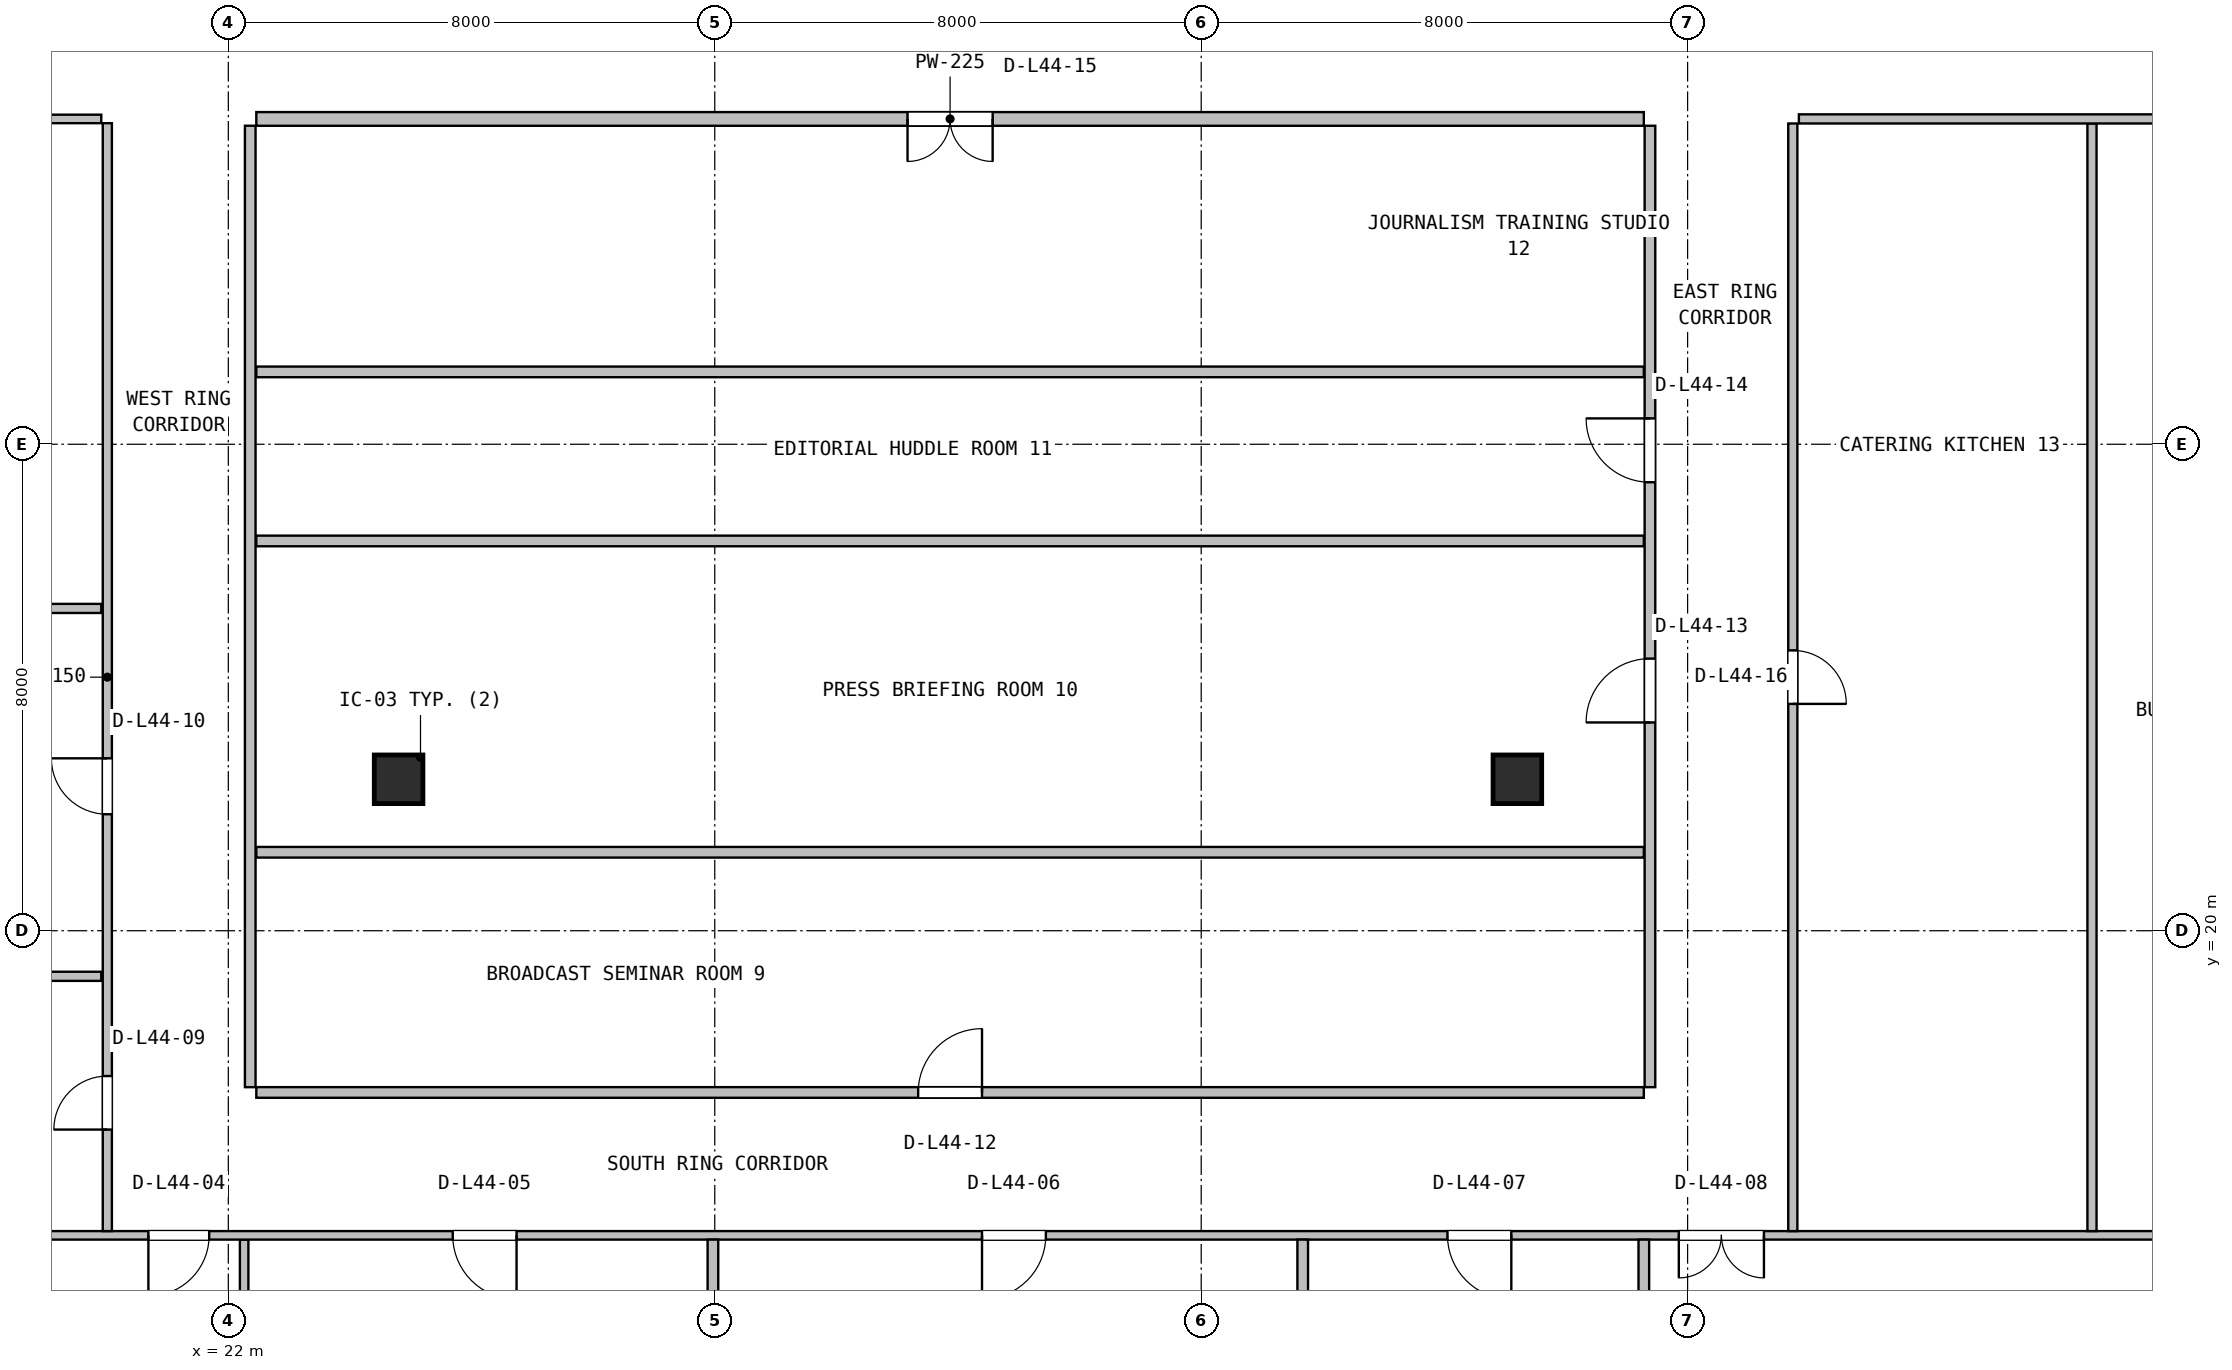
"""IFC4 building model, lengths in metres.
Left out: names, types, materials, properties, quantities, classifications, styles, units other than length and angle.
Written with IfcOpenShell. Run it as: python <this file> out.ifc"""

import sys

from ifc_helpers import new_model, si_unit, direction, frame, frame_2d, origin, origin_2d, place, context, subcontext, project, spatial, rectangle, extrude, source, transform, mapped, element, fill, save


model = new_model("IFC4")
c1 = context("Model", 3, precision=1e-05, world=origin(), true_north=direction((0.0, 1.0)))
c2 = subcontext(c1, "Body", "Model", "MODEL_VIEW")
j1 = project(units=[si_unit("LENGTHUNIT", "METRE"), si_unit("PLANEANGLEUNIT", "RADIAN")], contexts=[c1])
p1 = place(None, origin())
s1 = spatial("IfcSite", under=j1, at=p1, CompositionType="ELEMENT")
p2 = place(p1, origin())
s2 = spatial("IfcBuilding", under=s1, at=p2, CompositionType="ELEMENT")
p3 = place(p2, frame((0.0, 0.0, 180.0)))
s3 = spatial("IfcBuildingStorey", under=s2, at=p3, CompositionType="ELEMENT", Elevation=180.0)
m1 = source(origin(), c2, "Body", "SweptSolid", [
    extrude(rectangle(XDim=0.8, YDim=0.8, at=origin_2d()), origin(), (0.0, 0.0, 1.0), 3.8),
])
for number, where, z_axis, x_axis in (
    (1, (24.8, 22.49, 0.0), (0.0, 0.0, 1.0), (1.0, 0.0, 0.0)),
    (2, (43.2, 22.49, 0.0), (0.0, 0.0, 1.0), (1.0, 0.0, 0.0)),
):
    element("IfcColumn", number, at=place(p3, frame(where, z_axis=z_axis, x_axis=x_axis)), inside=s3, PredefinedType="COLUMN", context=c2, shape_type="MappedRepresentation", body=[
        mapped(m1, transform((0.0, 0.0, 0.0), x_axis=(1.0, 0.0, 0.0), y_axis=(0.0, 1.0, 0.0), z_axis=(0.0, 0.0, 1.0), scale=1.0)),
    ])
p4 = place(p3, frame((22.26, 7.38, 0.0), z_axis=(0.0, 0.0, 1.0), x_axis=(0.0, 1.0, 0.0)))
e3 = element("IfcWall", 3, at=p4, inside=s3, PredefinedType="PARTITIONING", context=c2, shape_type="SweptSolid", body=[
    extrude(rectangle(XDim=7.54, YDim=0.14, at=frame_2d((3.77, 0.0))), origin(), (0.0, 0.0, 1.0), 3.108),
])
p5 = place(p3, frame((7.18, 14.99, 0.0), z_axis=(0.0, 0.0, 1.0), x_axis=(1.0, 0.0, 0.0)))
e4 = element("IfcWall", 4, at=p5, inside=s3, PredefinedType="PARTITIONING", context=c2, shape_type="SweptSolid", body=[
    extrude(rectangle(XDim=53.64, YDim=0.14, at=frame_2d((26.82, 0.0))), origin(), (0.0, 0.0, 1.0), 2.909),
])
p6 = place(p5, frame((13.505, 0.0, 0.0)))
e5 = element("IfcOpeningElement", 5, at=p6, cuts=e4, PredefinedType="OPENING", context=c2, shape_type="SweptSolid", body=[
    extrude(rectangle(XDim=1.0, YDim=2.1, at=frame_2d((0.5, 1.05))), frame((0.0, 0.08, 0.0), z_axis=(0.0, -1.0, 0.0), x_axis=(1.0, 0.0, 0.0)), (0.0, 0.0, 1.0), 0.16),
])
p7 = place(p5, frame((18.51, 0.0, 0.0)))
e6 = element("IfcOpeningElement", 6, at=p7, cuts=e4, PredefinedType="OPENING", context=c2, shape_type="SweptSolid", body=[
    extrude(rectangle(XDim=1.05, YDim=2.1, at=frame_2d((0.525, 1.05))), frame((0.0, 0.08, 0.0), z_axis=(0.0, -1.0, 0.0), x_axis=(1.0, 0.0, 0.0)), (0.0, 0.0, 1.0), 0.16),
])
p8 = place(p5, frame((27.215, 0.0, 0.0)))
e7 = element("IfcOpeningElement", 7, at=p8, cuts=e4, PredefinedType="OPENING", context=c2, shape_type="SweptSolid", body=[
    extrude(rectangle(XDim=1.05, YDim=2.1, at=frame_2d((0.525, 1.05))), frame((0.0, 0.08, 0.0), z_axis=(0.0, -1.0, 0.0), x_axis=(1.0, 0.0, 0.0)), (0.0, 0.0, 1.0), 0.16),
])
p9 = place(p5, frame((34.87, 0.0, 0.0)))
e8 = element("IfcOpeningElement", 8, at=p9, cuts=e4, PredefinedType="OPENING", context=c2, shape_type="SweptSolid", body=[
    extrude(rectangle(XDim=1.05, YDim=2.1, at=frame_2d((0.525, 1.05))), frame((0.0, 0.08, 0.0), z_axis=(0.0, -1.0, 0.0), x_axis=(1.0, 0.0, 0.0)), (0.0, 0.0, 1.0), 0.16),
])
p10 = place(p5, frame((38.675, 0.0, 0.0)))
e9 = element("IfcOpeningElement", 9, at=p10, cuts=e4, PredefinedType="OPENING", context=c2, shape_type="SweptSolid", body=[
    extrude(rectangle(XDim=1.4, YDim=2.12, at=frame_2d((0.7, 1.06))), frame((0.0, 0.08, 0.0), z_axis=(0.0, -1.0, 0.0), x_axis=(1.0, 0.0, 0.0)), (0.0, 0.0, 1.0), 0.16),
])
for number, where, z_axis, x_axis in (
    (10, (29.97, 7.38, 0.0), (0.0, 0.0, 1.0), (0.0, 1.0, 0.0)),
    (11, (39.67, 7.38, 0.0), (0.0, 0.0, 1.0), (0.0, 1.0, 0.0)),
    (12, (45.28, 7.38, 0.0), (0.0, 0.0, 1.0), (0.0, 1.0, 0.0)),
):
    element("IfcWall", number, at=place(p3, frame(where, z_axis=z_axis, x_axis=x_axis)), inside=s3, PredefinedType="PARTITIONING", context=c2, shape_type="SweptSolid", body=[
        extrude(rectangle(XDim=7.54, YDim=0.175, at=frame_2d((3.77, 0.0))), origin(), (0.0, 0.0, 1.0), 3.108),
    ])
p11 = place(p3, frame((20.01, 15.06, 0.0), z_axis=(0.0, 0.0, 1.0), x_axis=(0.0, 1.0, 0.0)))
e13 = element("IfcWall", 13, at=p11, inside=s3, PredefinedType="PARTITIONING", context=c2, shape_type="SweptSolid", body=[
    extrude(rectangle(XDim=18.22, YDim=0.15, at=frame_2d((9.11, 0.0))), origin(), (0.0, 0.0, 1.0), 3.222),
])
p12 = place(p11, frame((1.67, 0.0, 0.0)))
e14 = element("IfcOpeningElement", 14, at=p12, cuts=e13, PredefinedType="OPENING", context=c2, shape_type="SweptSolid", body=[
    extrude(rectangle(XDim=0.88, YDim=2.06, at=frame_2d((0.44, 1.03))), frame((0.0, 0.085, 0.0), z_axis=(0.0, -1.0, 0.0), x_axis=(1.0, 0.0, 0.0)), (0.0, 0.0, 1.0), 0.17),
])
p13 = place(p11, frame((6.855, 0.0, 0.0)))
e15 = element("IfcOpeningElement", 15, at=p13, cuts=e13, PredefinedType="OPENING", context=c2, shape_type="SweptSolid", body=[
    extrude(rectangle(XDim=0.92, YDim=2.08, at=frame_2d((0.46, 1.04))), frame((0.0, 0.085, 0.0), z_axis=(0.0, -1.0, 0.0), x_axis=(1.0, 0.0, 0.0)), (0.0, 0.0, 1.0), 0.17),
])
for number, where, z_axis, x_axis in (
    (16, (7.18, 19.25, 0.0), (0.0, 0.0, 1.0), (1.0, 0.0, 0.0)),
    (17, (7.18, 25.3, 0.0), (0.0, 0.0, 1.0), (1.0, 0.0, 0.0)),
):
    element("IfcWall", number, at=place(p3, frame(where, z_axis=z_axis, x_axis=x_axis)), inside=s3, PredefinedType="PARTITIONING", context=c2, shape_type="SweptSolid", body=[
        extrude(rectangle(XDim=12.73, YDim=0.15, at=frame_2d((6.365, 0.0))), origin(), (0.0, 0.0, 1.0), 3.108),
    ])
p14 = place(p3, frame((7.18, 33.35, 0.0), z_axis=(0.0, 0.0, 1.0), x_axis=(1.0, 0.0, 0.0)))
e18 = element("IfcWall", 18, at=p14, inside=s3, PredefinedType="PARTITIONING", context=c2, shape_type="SweptSolid", body=[
    extrude(rectangle(XDim=12.73, YDim=0.14, at=frame_2d((6.365, 0.0))), origin(), (0.0, 0.0, 1.0), 3.108),
])
p15 = place(p14, frame((7.8, 0.0, 0.0)))
e19 = element("IfcOpeningElement", 19, at=p15, cuts=e18, PredefinedType="OPENING", context=c2, shape_type="SweptSolid", body=[
    extrude(rectangle(XDim=1.0, YDim=2.1, at=frame_2d((0.5, 1.05))), frame((0.0, 0.08, 0.0), z_axis=(0.0, -1.0, 0.0), x_axis=(1.0, 0.0, 0.0)), (0.0, 0.0, 1.0), 0.16),
])
p16 = place(p3, frame((22.46, 17.34, 0.0), z_axis=(0.0, 0.0, 1.0), x_axis=(1.0, 0.0, 0.0)))
e20 = element("IfcWall", 20, at=p16, inside=s3, PredefinedType="PARTITIONING", context=c2, shape_type="SweptSolid", body=[
    extrude(rectangle(XDim=22.82, YDim=0.175, at=frame_2d((11.41, 0.0))), origin(), (0.0, 0.0, 1.0), 2.909),
])
p17 = place(p16, frame((10.885, 0.0, 0.0)))
e21 = element("IfcOpeningElement", 21, at=p17, cuts=e20, PredefinedType="OPENING", context=c2, shape_type="SweptSolid", body=[
    extrude(rectangle(XDim=1.05, YDim=2.1, at=frame_2d((0.525, 1.05))), frame((0.0, 0.098, 0.0), z_axis=(0.0, -1.0, 0.0), x_axis=(1.0, 0.0, 0.0)), (0.0, 0.0, 1.0), 0.195),
])
p18 = place(p3, frame((45.38, 17.427, 0.0), z_axis=(0.0, 0.0, 1.0), x_axis=(0.0, 1.0, 0.0)))
e22 = element("IfcWall", 22, at=p18, inside=s3, PredefinedType="PARTITIONING", context=c2, shape_type="SweptSolid", body=[
    extrude(rectangle(XDim=15.811, YDim=0.175, at=frame_2d((7.906, 0.0))), origin(), (0.0, 0.0, 1.0), 3.222),
])
p19 = place(p18, frame((5.998, 0.0, 0.0)))
e23 = element("IfcOpeningElement", 23, at=p19, cuts=e22, PredefinedType="OPENING", context=c2, shape_type="SweptSolid", body=[
    extrude(rectangle(XDim=1.05, YDim=2.1, at=frame_2d((0.525, 1.05))), frame((0.0, 0.098, 0.0), z_axis=(0.0, -1.0, 0.0), x_axis=(1.0, 0.0, 0.0)), (0.0, 0.0, 1.0), 0.195),
])
p20 = place(p18, frame((9.948, 0.0, 0.0)))
e24 = element("IfcOpeningElement", 24, at=p20, cuts=e22, PredefinedType="OPENING", context=c2, shape_type="SweptSolid", body=[
    extrude(rectangle(XDim=1.05, YDim=2.1, at=frame_2d((0.525, 1.05))), frame((0.0, 0.098, 0.0), z_axis=(0.0, -1.0, 0.0), x_axis=(1.0, 0.0, 0.0)), (0.0, 0.0, 1.0), 0.195),
])
p21 = place(p3, frame((22.46, 21.29, 0.0), z_axis=(0.0, 0.0, 1.0), x_axis=(1.0, 0.0, 0.0)))
e25 = element("IfcWall", 25, at=p21, inside=s3, PredefinedType="PARTITIONING", context=c2, shape_type="SweptSolid", body=[
    extrude(rectangle(XDim=22.82, YDim=0.175, at=frame_2d((11.41, 0.0))), origin(), (0.0, 0.0, 1.0), 2.909),
])
p22 = place(p3, frame((22.36, 17.427, 0.0), z_axis=(0.0, 0.0, 1.0), x_axis=(0.0, 1.0, 0.0)))
e26 = element("IfcWall", 26, at=p22, inside=s3, PredefinedType="PARTITIONING", context=c2, shape_type="SweptSolid", body=[
    extrude(rectangle(XDim=15.811, YDim=0.175, at=frame_2d((7.906, 0.0))), origin(), (0.0, 0.0, 1.0), 3.222),
])
for number, where, z_axis, x_axis in (
    (27, (22.46, 26.41, 0.0), (0.0, 0.0, 1.0), (1.0, 0.0, 0.0)),
    (28, (22.46, 29.19, 0.0), (0.0, 0.0, 1.0), (1.0, 0.0, 0.0)),
):
    element("IfcWall", number, at=place(p3, frame(where, z_axis=z_axis, x_axis=x_axis)), inside=s3, PredefinedType="PARTITIONING", context=c2, shape_type="SweptSolid", body=[
        extrude(rectangle(XDim=22.82, YDim=0.175, at=frame_2d((11.41, 0.0))), origin(), (0.0, 0.0, 1.0), 2.909),
    ])
p23 = place(p3, frame((22.46, 33.35, 0.0), z_axis=(0.0, 0.0, 1.0), x_axis=(1.0, 0.0, 0.0)))
e29 = element("IfcWall", 29, at=p23, inside=s3, PredefinedType="PARTITIONING", context=c2, shape_type="SweptSolid", body=[
    extrude(rectangle(XDim=22.82, YDim=0.225, at=frame_2d((11.41, 0.0))), origin(), (0.0, 0.0, 1.0), 2.909),
])
p24 = place(p23, frame((10.71, 0.0, 0.0)))
e30 = element("IfcOpeningElement", 30, at=p24, cuts=e29, PredefinedType="OPENING", context=c2, shape_type="SweptSolid", body=[
    extrude(rectangle(XDim=1.4, YDim=2.12, at=frame_2d((0.7, 1.06))), frame((0.0, 0.123, 0.0), z_axis=(0.0, -1.0, 0.0), x_axis=(1.0, 0.0, 0.0)), (0.0, 0.0, 1.0), 0.245),
])
p25 = place(p3, frame((52.65, 15.06, 0.0), z_axis=(0.0, 0.0, 1.0), x_axis=(0.0, 1.0, 0.0)))
e31 = element("IfcWall", 31, at=p25, inside=s3, PredefinedType="PARTITIONING", context=c2, shape_type="SweptSolid", body=[
    extrude(rectangle(XDim=18.215, YDim=0.15, at=frame_2d((9.107, 0.0))), origin(), (0.0, 0.0, 1.0), 3.222),
])
p26 = place(p3, frame((47.83, 33.35, 0.0), z_axis=(0.0, 0.0, 1.0), x_axis=(1.0, 0.0, 0.0)))
e32 = element("IfcWall", 32, at=p26, inside=s3, PredefinedType="PARTITIONING", context=c2, shape_type="SweptSolid", body=[
    extrude(rectangle(XDim=12.99, YDim=0.15, at=frame_2d((6.495, 0.0))), origin(), (0.0, 0.0, 1.0), 3.108),
])
p27 = place(p26, frame((6.61, 0.0, 0.0)))
e33 = element("IfcOpeningElement", 33, at=p27, cuts=e32, PredefinedType="OPENING", context=c2, shape_type="SweptSolid", body=[
    extrude(rectangle(XDim=0.92, YDim=2.08, at=frame_2d((0.46, 1.04))), frame((0.0, 0.085, 0.0), z_axis=(0.0, -1.0, 0.0), x_axis=(1.0, 0.0, 0.0)), (0.0, 0.0, 1.0), 0.17),
])
p28 = place(p3, frame((47.73, 15.06, 0.0), z_axis=(0.0, 0.0, 1.0), x_axis=(0.0, 1.0, 0.0)))
e34 = element("IfcWall", 34, at=p28, inside=s3, PredefinedType="PARTITIONING", context=c2, shape_type="SweptSolid", body=[
    extrude(rectangle(XDim=18.215, YDim=0.15, at=frame_2d((9.107, 0.0))), origin(), (0.0, 0.0, 1.0), 3.222),
])
p29 = place(p28, frame((8.67, 0.0, 0.0)))
e35 = element("IfcOpeningElement", 35, at=p29, cuts=e34, PredefinedType="OPENING", context=c2, shape_type="SweptSolid", body=[
    extrude(rectangle(XDim=0.88, YDim=2.06, at=frame_2d((0.44, 1.03))), frame((0.0, 0.085, 0.0), z_axis=(0.0, -1.0, 0.0), x_axis=(1.0, 0.0, 0.0)), (0.0, 0.0, 1.0), 0.17),
])
m2 = source(origin(), c2, "Body", "SweptSolid", [
    extrude(rectangle(XDim=1.0, YDim=2.1, at=frame_2d((0.5, 1.05))), frame((0.0, 0.025, 0.0), z_axis=(0.0, -1.0, 0.0), x_axis=(1.0, 0.0, 0.0)), (0.0, 0.0, 1.0), 0.05),
])
p30 = place(p6, frame((1.0, 0.0, 0.0), z_axis=(0.0, 0.0, 1.0), x_axis=(-1.0, 0.0, 0.0)))
e36 = element("IfcDoor", 36, at=p30, inside=s3, OperationType="SINGLE_SWING_LEFT", PredefinedType="DOOR", context=c2, shape_type="MappedRepresentation", body=[
    mapped(m2, transform((0.0, 0.0, 0.0), x_axis=(1.0, 0.0, 0.0), y_axis=(0.0, 1.0, 0.0), z_axis=(0.0, 0.0, 1.0), scale=1.0)),
])
fill(e5, e36)
m3 = source(origin(), c2, "Body", "SweptSolid", [
    extrude(rectangle(XDim=1.05, YDim=2.1, at=frame_2d((0.525, 1.05))), frame((0.0, 0.025, 0.0), z_axis=(0.0, -1.0, 0.0), x_axis=(1.0, 0.0, 0.0)), (0.0, 0.0, 1.0), 0.05),
])
p31 = place(p7, frame((1.05, 0.0, 0.0), z_axis=(0.0, 0.0, 1.0), x_axis=(-1.0, 0.0, 0.0)))
e37 = element("IfcDoor", 37, at=p31, inside=s3, OperationType="SINGLE_SWING_RIGHT", PredefinedType="DOOR", context=c2, shape_type="MappedRepresentation", body=[
    mapped(m3, transform((0.0, 0.0, 0.0), x_axis=(1.0, 0.0, 0.0), y_axis=(0.0, 1.0, 0.0), z_axis=(0.0, 0.0, 1.0), scale=1.0)),
])
fill(e6, e37)
p32 = place(p8, frame((1.05, 0.0, 0.0), z_axis=(0.0, 0.0, 1.0), x_axis=(-1.0, 0.0, 0.0)))
e38 = element("IfcDoor", 38, at=p32, inside=s3, OperationType="SINGLE_SWING_LEFT", PredefinedType="DOOR", context=c2, shape_type="MappedRepresentation", body=[
    mapped(m3, transform((0.0, 0.0, 0.0), x_axis=(1.0, 0.0, 0.0), y_axis=(0.0, 1.0, 0.0), z_axis=(0.0, 0.0, 1.0), scale=1.0)),
])
fill(e7, e38)
p33 = place(p9, frame((1.05, 0.0, 0.0), z_axis=(0.0, 0.0, 1.0), x_axis=(-1.0, 0.0, 0.0)))
e39 = element("IfcDoor", 39, at=p33, inside=s3, OperationType="SINGLE_SWING_RIGHT", PredefinedType="DOOR", context=c2, shape_type="MappedRepresentation", body=[
    mapped(m3, transform((0.0, 0.0, 0.0), x_axis=(1.0, 0.0, 0.0), y_axis=(0.0, 1.0, 0.0), z_axis=(0.0, 0.0, 1.0), scale=1.0)),
])
fill(e8, e39)
m4 = source(origin(), c2, "Body", "SweptSolid", [
    extrude(rectangle(XDim=1.4, YDim=2.12, at=frame_2d((0.7, 1.06))), frame((0.0, 0.025, 0.0), z_axis=(0.0, -1.0, 0.0), x_axis=(1.0, 0.0, 0.0)), (0.0, 0.0, 1.0), 0.05),
])
p34 = place(p10, frame((1.4, 0.0, 0.0), z_axis=(0.0, 0.0, 1.0), x_axis=(-1.0, 0.0, 0.0)))
e40 = element("IfcDoor", 40, at=p34, inside=s3, OperationType="DOUBLE_DOOR_SINGLE_SWING", PredefinedType="DOOR", context=c2, shape_type="MappedRepresentation", body=[
    mapped(m4, transform((0.0, 0.0, 0.0), x_axis=(1.0, 0.0, 0.0), y_axis=(0.0, 1.0, 0.0), z_axis=(0.0, 0.0, 1.0), scale=1.0)),
])
fill(e9, e40)
m5 = source(origin(), c2, "Body", "SweptSolid", [
    extrude(rectangle(XDim=0.88, YDim=2.06, at=frame_2d((0.44, 1.03))), frame((0.0, 0.025, 0.0), z_axis=(0.0, -1.0, 0.0), x_axis=(1.0, 0.0, 0.0)), (0.0, 0.0, 1.0), 0.05),
])
p35 = place(p12, origin())
e41 = element("IfcDoor", 41, at=p35, inside=s3, OperationType="SINGLE_SWING_LEFT", PredefinedType="DOOR", context=c2, shape_type="MappedRepresentation", body=[
    mapped(m5, transform((0.0, 0.0, 0.0), x_axis=(1.0, 0.0, 0.0), y_axis=(0.0, 1.0, 0.0), z_axis=(0.0, 0.0, 1.0), scale=1.0)),
])
fill(e14, e41)
m6 = source(origin(), c2, "Body", "SweptSolid", [
    extrude(rectangle(XDim=0.92, YDim=2.08, at=frame_2d((0.46, 1.04))), frame((0.0, 0.025, 0.0), z_axis=(0.0, -1.0, 0.0), x_axis=(1.0, 0.0, 0.0)), (0.0, 0.0, 1.0), 0.05),
])
p36 = place(p13, origin())
e42 = element("IfcDoor", 42, at=p36, inside=s3, OperationType="SINGLE_SWING_RIGHT", PredefinedType="DOOR", context=c2, shape_type="MappedRepresentation", body=[
    mapped(m6, transform((0.0, 0.0, 0.0), x_axis=(1.0, 0.0, 0.0), y_axis=(0.0, 1.0, 0.0), z_axis=(0.0, 0.0, 1.0), scale=1.0)),
])
fill(e15, e42)
p37 = place(p17, origin())
e43 = element("IfcDoor", 43, at=p37, inside=s3, OperationType="SINGLE_SWING_RIGHT", PredefinedType="DOOR", context=c2, shape_type="MappedRepresentation", body=[
    mapped(m3, transform((0.0, 0.0, 0.0), x_axis=(1.0, 0.0, 0.0), y_axis=(0.0, 1.0, 0.0), z_axis=(0.0, 0.0, 1.0), scale=1.0)),
])
fill(e21, e43)
p38 = place(p19, origin())
e44 = element("IfcDoor", 44, at=p38, inside=s3, OperationType="SINGLE_SWING_LEFT", PredefinedType="DOOR", context=c2, shape_type="MappedRepresentation", body=[
    mapped(m3, transform((0.0, 0.0, 0.0), x_axis=(1.0, 0.0, 0.0), y_axis=(0.0, 1.0, 0.0), z_axis=(0.0, 0.0, 1.0), scale=1.0)),
])
fill(e23, e44)
p39 = place(p20, origin())
e45 = element("IfcDoor", 45, at=p39, inside=s3, OperationType="SINGLE_SWING_RIGHT", PredefinedType="DOOR", context=c2, shape_type="MappedRepresentation", body=[
    mapped(m3, transform((0.0, 0.0, 0.0), x_axis=(1.0, 0.0, 0.0), y_axis=(0.0, 1.0, 0.0), z_axis=(0.0, 0.0, 1.0), scale=1.0)),
])
fill(e24, e45)
p40 = place(p24, frame((1.4, 0.0, 0.0), z_axis=(0.0, 0.0, 1.0), x_axis=(-1.0, 0.0, 0.0)))
e46 = element("IfcDoor", 46, at=p40, inside=s3, OperationType="DOUBLE_DOOR_SINGLE_SWING", PredefinedType="DOOR", context=c2, shape_type="MappedRepresentation", body=[
    mapped(m4, transform((0.0, 0.0, 0.0), x_axis=(1.0, 0.0, 0.0), y_axis=(0.0, 1.0, 0.0), z_axis=(0.0, 0.0, 1.0), scale=1.0)),
])
fill(e30, e46)
p41 = place(p29, frame((0.88, 0.0, 0.0), z_axis=(0.0, 0.0, 1.0), x_axis=(-1.0, 0.0, 0.0)))
e47 = element("IfcDoor", 47, at=p41, inside=s3, OperationType="SINGLE_SWING_LEFT", PredefinedType="DOOR", context=c2, shape_type="MappedRepresentation", body=[
    mapped(m5, transform((0.0, 0.0, 0.0), x_axis=(1.0, 0.0, 0.0), y_axis=(0.0, 1.0, 0.0), z_axis=(0.0, 0.0, 1.0), scale=1.0)),
])
fill(e35, e47)
save(model, sys.argv[1])
